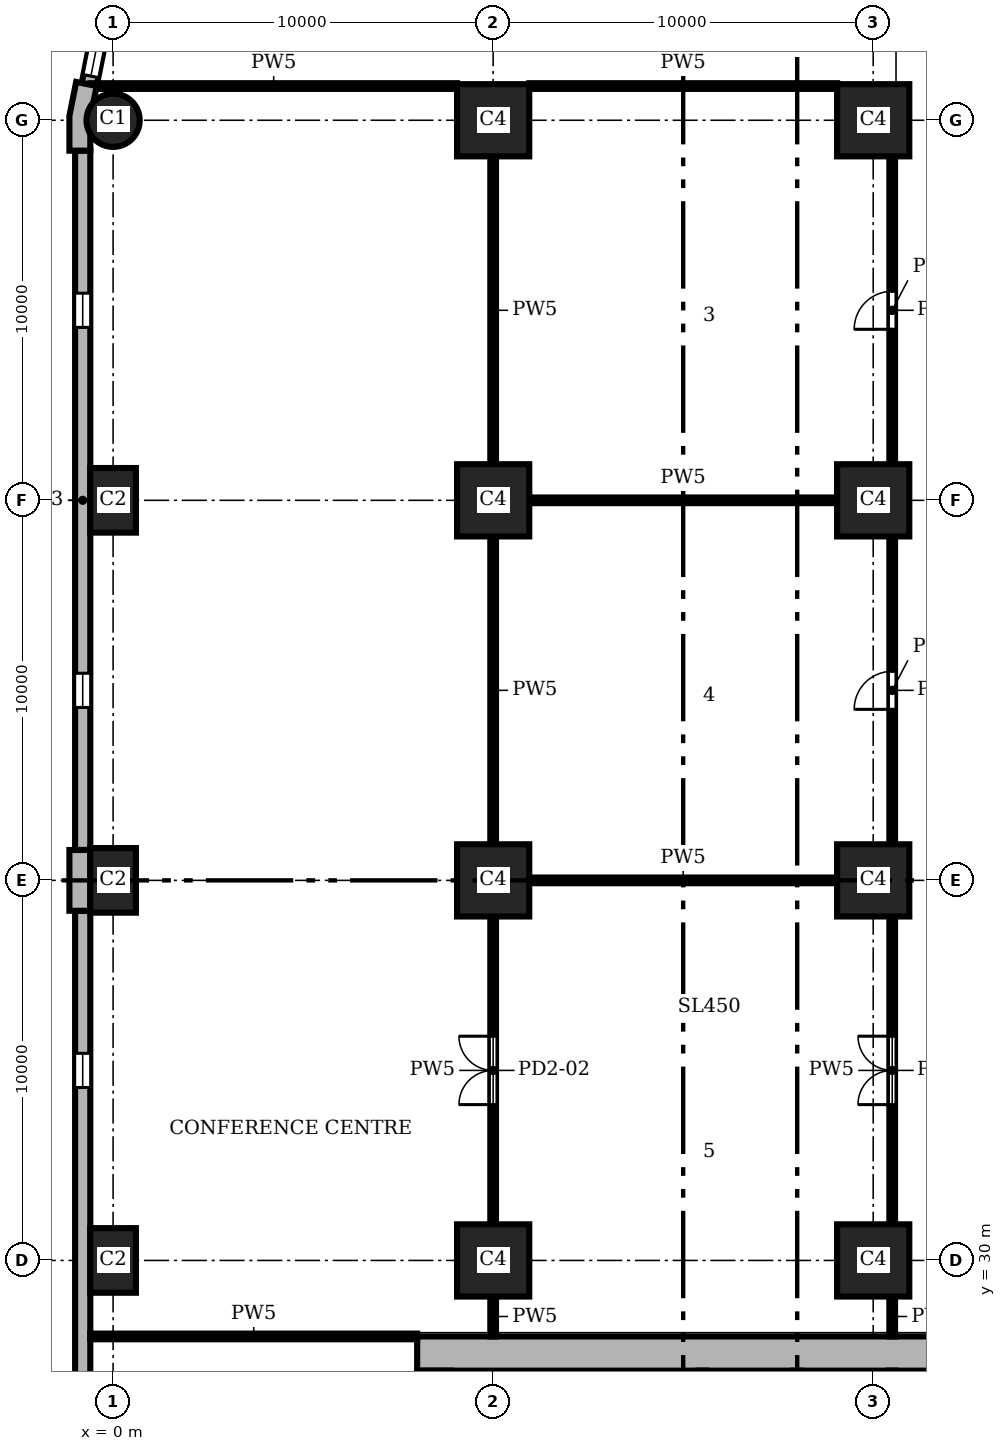
"""IFC4 building model, lengths in metres.
Left out: names, types, materials, properties, quantities, classifications, styles, units other than length and angle.
Written with IfcOpenShell. Run it as: python <this file> out.ifc"""

import sys

from ifc_helpers import new_model, si_unit, direction, frame, frame_2d, origin, origin_2d, place, context, subcontext, project, spatial, polyline, rectangle, circle, outline, extrude, element, fill, save


model = new_model("IFC4")
c1 = context("Model", 3, precision=1e-05, world=origin(), true_north=direction((0.0, 1.0)))
c2 = subcontext(c1, "Body", "Model", "MODEL_VIEW")
j1 = project(units=[si_unit("LENGTHUNIT", "METRE"), si_unit("PLANEANGLEUNIT", "RADIAN")], contexts=[c1])
p1 = place(None, origin())
s1 = spatial("IfcSite", under=j1, at=p1, CompositionType="ELEMENT")
p2 = place(p1, origin())
s2 = spatial("IfcBuilding", under=s1, at=p2, CompositionType="ELEMENT")
p3 = place(p2, frame((0.0, 0.0, 6.0)))
s3 = spatial("IfcBuildingStorey", under=s2, at=p3, CompositionType="ELEMENT", Elevation=6.0)
p4 = place(p3, frame((0.0, 60.0, 0.0), z_axis=(0.0, 0.0, 1.0), x_axis=(1.0, 0.0, 0.0)))
e1 = element("IfcColumn", 1, at=p4, inside=s3, PredefinedType="COLUMN", context=c2, shape_type="SweptSolid", body=[
    extrude(circle(Radius=0.7, at=origin_2d()), origin(), (0.0, 0.0, 1.0), 6.0),
])
for number, where, z_axis, x_axis in (
    (2, (0.0, 50.0, 0.0), (0.0, 0.0, 1.0), (0.0, 1.0, 0.0)),
    (3, (0.0, 40.0, 0.0), (0.0, 0.0, 1.0), (0.0, 1.0, 0.0)),
    (4, (0.0, 30.0, 0.0), (0.0, 0.0, 1.0), (0.0, 1.0, 0.0)),
):
    element("IfcColumn", number, at=place(p3, frame(where, z_axis=z_axis, x_axis=x_axis)), inside=s3, PredefinedType="COLUMN", context=c2, shape_type="SweptSolid", body=[
        extrude(rectangle(XDim=1.7, YDim=1.2, at=origin_2d()), origin(), (0.0, 0.0, 1.0), 6.0),
    ])
for number, where, z_axis, x_axis in (
    (5, (10.0, 30.0, 0.0), (0.0, 0.0, 1.0), (1.0, 0.0, 0.0)),
    (6, (10.0, 40.0, 0.0), (0.0, 0.0, 1.0), (1.0, 0.0, 0.0)),
    (7, (10.0, 50.0, 0.0), (0.0, 0.0, 1.0), (1.0, 0.0, 0.0)),
    (8, (10.0, 60.0, 0.0), (0.0, 0.0, 1.0), (1.0, 0.0, 0.0)),
    (9, (20.0, 30.0, 0.0), (0.0, 0.0, 1.0), (1.0, 0.0, 0.0)),
    (10, (20.0, 40.0, 0.0), (0.0, 0.0, 1.0), (1.0, 0.0, 0.0)),
    (11, (20.0, 50.0, 0.0), (0.0, 0.0, 1.0), (1.0, 0.0, 0.0)),
    (12, (20.0, 60.0, 0.0), (0.0, 0.0, 1.0), (1.0, 0.0, 0.0)),
):
    element("IfcColumn", number, at=place(p3, frame(where, z_axis=z_axis, x_axis=x_axis)), inside=s3, PredefinedType="COLUMN", context=c2, shape_type="SweptSolid", body=[
        extrude(rectangle(XDim=1.9, YDim=1.9, at=origin_2d()), origin(), (0.0, 0.0, 1.0), 6.0),
    ])
p5 = place(p3, frame((28.0, 27.55, 0.0), z_axis=(0.0, 0.0, 1.0), x_axis=(-1.0, 0.0, 0.0)))
e13 = element("IfcWall", 13, at=p5, inside=s3, PredefinedType="SHEAR", context=c2, shape_type="SweptSolid", body=[
    extrude(rectangle(XDim=20.0, YDim=0.9, at=frame_2d((10.0, 0.0))), origin(), (0.0, 0.0, 1.0), 6.0),
])
p6 = place(p3, origin())
e14 = element("IfcWall", 14, at=p6, inside=s3, PredefinedType="SOLIDWALL", context=c2, shape_type="SweptSolid", body=[
    extrude(outline(polyline([(-0.825, 60.98), (-0.972, 61.009), (-1.15, 60.113), (-1.15, 59.2), (-1.0, 59.2), (-0.6, 59.2), (-0.6, 60.059), (-0.432, 60.902), (-0.825, 60.98)])), origin(), (0.0, 0.0, 1.0), 6.0),
])
e15 = element("IfcWall", 15, at=p6, inside=s3, PredefinedType="SOLIDWALL", context=c2, shape_type="SweptSolid", body=[
    extrude(outline(polyline([(-1.0, 40.8), (-1.15, 40.8), (-1.15, 40.0), (-1.15, 39.2), (-1.0, 39.2), (-0.6, 39.2), (-0.6, 40.0), (-0.6, 40.8), (-1.0, 40.8)])), origin(), (0.0, 0.0, 1.0), 6.0),
])
p7 = place(p3, frame((0.299, 65.602, 0.0), z_axis=(0.0, 0.0, 1.0), x_axis=(-0.195098533057, -0.98078364709, 0.0)))
e16 = element("IfcWall", 16, at=p7, inside=s3, PredefinedType="SOLIDWALL", context=c2, shape_type="SweptSolid", body=[
    extrude(rectangle(XDim=4.753, YDim=0.4, at=frame_2d((2.376, 0.0))), origin(), (0.0, 0.0, 1.0), 6.0),
])
p8 = place(p7, frame((0.226, 0.0, 0.9)))
e17 = element("IfcOpeningElement", 17, at=p8, cuts=e16, PredefinedType="OPENING", context=c2, shape_type="SweptSolid", body=[
    extrude(rectangle(XDim=4.3, YDim=4.4, at=frame_2d((2.15, 2.2))), frame((0.0, 0.21, 0.0), z_axis=(0.0, -1.0, 0.0), x_axis=(1.0, 0.0, 0.0)), (0.0, 0.0, 1.0), 0.42),
])
p9 = place(p3, frame((-0.8, 59.2, 0.0), z_axis=(0.0, 0.0, 1.0), x_axis=(0.0, -1.0, 0.0)))
e18 = element("IfcWall", 18, at=p9, inside=s3, PredefinedType="SOLIDWALL", context=c2, shape_type="SweptSolid", body=[
    extrude(rectangle(XDim=18.4, YDim=0.4, at=frame_2d((9.2, 0.0))), origin(), (0.0, 0.0, 1.0), 6.0),
])
p10 = place(p9, frame((3.75, 0.0, 1.0)))
e19 = element("IfcOpeningElement", 19, at=p10, cuts=e18, PredefinedType="OPENING", context=c2, shape_type="SweptSolid", body=[
    extrude(rectangle(XDim=0.9, YDim=4.2, at=frame_2d((0.45, 2.1))), frame((0.0, 0.21, 0.0), z_axis=(0.0, -1.0, 0.0), x_axis=(1.0, 0.0, 0.0)), (0.0, 0.0, 1.0), 0.42),
])
p11 = place(p9, frame((13.75, 0.0, 1.0)))
e20 = element("IfcOpeningElement", 20, at=p11, cuts=e18, PredefinedType="OPENING", context=c2, shape_type="SweptSolid", body=[
    extrude(rectangle(XDim=0.9, YDim=4.2, at=frame_2d((0.45, 2.1))), frame((0.0, 0.21, 0.0), z_axis=(0.0, -1.0, 0.0), x_axis=(1.0, 0.0, 0.0)), (0.0, 0.0, 1.0), 0.42),
])
p12 = place(p3, frame((-0.8, 39.2, 0.0), z_axis=(0.0, 0.0, 1.0), x_axis=(0.0, -1.0, 0.0)))
e21 = element("IfcWall", 21, at=p12, inside=s3, PredefinedType="SOLIDWALL", context=c2, shape_type="SweptSolid", body=[
    extrude(rectangle(XDim=18.4, YDim=0.4, at=frame_2d((9.2, 0.0))), origin(), (0.0, 0.0, 1.0), 6.0),
])
p13 = place(p12, frame((3.75, 0.0, 1.0)))
e22 = element("IfcOpeningElement", 22, at=p13, cuts=e21, PredefinedType="OPENING", context=c2, shape_type="SweptSolid", body=[
    extrude(rectangle(XDim=0.9, YDim=4.2, at=frame_2d((0.45, 2.1))), frame((0.0, 0.21, 0.0), z_axis=(0.0, -1.0, 0.0), x_axis=(1.0, 0.0, 0.0)), (0.0, 0.0, 1.0), 0.42),
])
p14 = place(p12, frame((13.75, 0.0, 1.0)))
e23 = element("IfcOpeningElement", 23, at=p14, cuts=e21, PredefinedType="OPENING", context=c2, shape_type="SweptSolid", body=[
    extrude(rectangle(XDim=0.9, YDim=4.2, at=frame_2d((0.45, 2.1))), frame((0.0, 0.21, 0.0), z_axis=(0.0, -1.0, 0.0), x_axis=(1.0, 0.0, 0.0)), (0.0, 0.0, 1.0), 0.42),
])
p15 = place(p3, frame((10.0, 28.0, 0.0), z_axis=(0.0, 0.0, 1.0), x_axis=(0.0, 1.0, 0.0)))
e24 = element("IfcWall", 24, at=p15, inside=s3, PredefinedType="PARTITIONING", context=c2, shape_type="SweptSolid", body=[
    extrude(rectangle(XDim=1.05, YDim=0.15, at=frame_2d((0.525, 0.0))), origin(), (0.0, 0.0, 1.0), 5.68),
])
p16 = place(p3, frame((10.0, 30.95, 0.0), z_axis=(0.0, 0.0, 1.0), x_axis=(0.0, 1.0, 0.0)))
e25 = element("IfcWall", 25, at=p16, inside=s3, PredefinedType="PARTITIONING", context=c2, shape_type="SweptSolid", body=[
    extrude(rectangle(XDim=8.1, YDim=0.15, at=frame_2d((4.05, 0.0))), origin(), (0.0, 0.0, 1.0), 5.68),
])
p17 = place(p16, frame((3.15, 0.0, 0.0)))
e26 = element("IfcOpeningElement", 26, at=p17, cuts=e25, PredefinedType="OPENING", context=c2, shape_type="SweptSolid", body=[
    extrude(rectangle(XDim=1.8, YDim=2.1, at=frame_2d((0.9, 1.05))), frame((0.0, 0.085, 0.0), z_axis=(0.0, -1.0, 0.0), x_axis=(1.0, 0.0, 0.0)), (0.0, 0.0, 1.0), 0.17),
])
for number, where, z_axis, x_axis in (
    (27, (10.0, 40.95, 0.0), (0.0, 0.0, 1.0), (0.0, 1.0, 0.0)),
    (28, (10.0, 50.95, 0.0), (0.0, 0.0, 1.0), (0.0, 1.0, 0.0)),
):
    element("IfcWall", number, at=place(p3, frame(where, z_axis=z_axis, x_axis=x_axis)), inside=s3, PredefinedType="PARTITIONING", context=c2, shape_type="SweptSolid", body=[
        extrude(rectangle(XDim=8.1, YDim=0.15, at=frame_2d((4.05, 0.0))), origin(), (0.0, 0.0, 1.0), 5.68),
    ])
p18 = place(p3, frame((20.5, 28.0, 0.0), z_axis=(0.0, 0.0, 1.0), x_axis=(0.0, 1.0, 0.0)))
e29 = element("IfcWall", 29, at=p18, inside=s3, PredefinedType="PARTITIONING", context=c2, shape_type="SweptSolid", body=[
    extrude(rectangle(XDim=1.05, YDim=0.15, at=frame_2d((0.525, 0.0))), origin(), (0.0, 0.0, 1.0), 5.68),
])
p19 = place(p3, frame((20.5, 30.95, 0.0), z_axis=(0.0, 0.0, 1.0), x_axis=(0.0, 1.0, 0.0)))
e30 = element("IfcWall", 30, at=p19, inside=s3, PredefinedType="PARTITIONING", context=c2, shape_type="SweptSolid", body=[
    extrude(rectangle(XDim=8.1, YDim=0.15, at=frame_2d((4.05, 0.0))), origin(), (0.0, 0.0, 1.0), 5.68),
])
p20 = place(p19, frame((3.15, 0.0, 0.0)))
e31 = element("IfcOpeningElement", 31, at=p20, cuts=e30, PredefinedType="OPENING", context=c2, shape_type="SweptSolid", body=[
    extrude(rectangle(XDim=1.8, YDim=2.1, at=frame_2d((0.9, 1.05))), frame((0.0, 0.085, 0.0), z_axis=(0.0, -1.0, 0.0), x_axis=(1.0, 0.0, 0.0)), (0.0, 0.0, 1.0), 0.17),
])
p21 = place(p3, frame((20.5, 40.95, 0.0), z_axis=(0.0, 0.0, 1.0), x_axis=(0.0, 1.0, 0.0)))
e32 = element("IfcWall", 32, at=p21, inside=s3, PredefinedType="PARTITIONING", context=c2, shape_type="SweptSolid", body=[
    extrude(rectangle(XDim=8.1, YDim=0.15, at=frame_2d((4.05, 0.0))), origin(), (0.0, 0.0, 1.0), 5.68),
])
p22 = place(p21, frame((3.55, 0.0, 0.0)))
e33 = element("IfcOpeningElement", 33, at=p22, cuts=e32, PredefinedType="OPENING", context=c2, shape_type="SweptSolid", body=[
    extrude(rectangle(XDim=1.0, YDim=2.1, at=frame_2d((0.5, 1.05))), frame((0.0, 0.085, 0.0), z_axis=(0.0, -1.0, 0.0), x_axis=(1.0, 0.0, 0.0)), (0.0, 0.0, 1.0), 0.17),
])
p23 = place(p3, frame((20.5, 50.95, 0.0), z_axis=(0.0, 0.0, 1.0), x_axis=(0.0, 1.0, 0.0)))
e34 = element("IfcWall", 34, at=p23, inside=s3, PredefinedType="PARTITIONING", context=c2, shape_type="SweptSolid", body=[
    extrude(rectangle(XDim=8.1, YDim=0.15, at=frame_2d((4.05, 0.0))), origin(), (0.0, 0.0, 1.0), 5.68),
])
p24 = place(p23, frame((3.55, 0.0, 0.0)))
e35 = element("IfcOpeningElement", 35, at=p24, cuts=e34, PredefinedType="OPENING", context=c2, shape_type="SweptSolid", body=[
    extrude(rectangle(XDim=1.0, YDim=2.1, at=frame_2d((0.5, 1.05))), frame((0.0, 0.085, 0.0), z_axis=(0.0, -1.0, 0.0), x_axis=(1.0, 0.0, 0.0)), (0.0, 0.0, 1.0), 0.17),
])
for number, where, z_axis, x_axis in (
    (36, (10.95, 40.0, 0.0), (0.0, 0.0, 1.0), (1.0, 0.0, 0.0)),
    (37, (10.95, 50.0, 0.0), (0.0, 0.0, 1.0), (1.0, 0.0, 0.0)),
):
    element("IfcWall", number, at=place(p3, frame(where, z_axis=z_axis, x_axis=x_axis)), inside=s3, PredefinedType="PARTITIONING", context=c2, shape_type="SweptSolid", body=[
        extrude(rectangle(XDim=8.1, YDim=0.15, at=frame_2d((4.05, 0.0))), origin(), (0.0, 0.0, 1.0), 5.68),
    ])
p25 = place(p3, frame((-0.6, 60.9, 0.0), z_axis=(0.0, 0.0, 1.0), x_axis=(1.0, 0.0, 0.0)))
e38 = element("IfcWall", 38, at=p25, inside=s3, PredefinedType="PARTITIONING", context=c2, shape_type="SweptSolid", body=[
    extrude(rectangle(XDim=9.65, YDim=0.15, at=frame_2d((4.825, 0.0))), origin(), (0.0, 0.0, 1.0), 5.68),
])
p26 = place(p3, frame((10.95, 60.9, 0.0), z_axis=(0.0, 0.0, 1.0), x_axis=(1.0, 0.0, 0.0)))
e39 = element("IfcWall", 39, at=p26, inside=s3, PredefinedType="PARTITIONING", context=c2, shape_type="SweptSolid", body=[
    extrude(rectangle(XDim=8.1, YDim=0.15, at=frame_2d((4.05, 0.0))), origin(), (0.0, 0.0, 1.0), 5.68),
])
p27 = place(p3, frame((-0.6, 28.0, 0.0), z_axis=(0.0, 0.0, 1.0), x_axis=(1.0, 0.0, 0.0)))
e40 = element("IfcWall", 40, at=p27, inside=s3, PredefinedType="PARTITIONING", context=c2, shape_type="SweptSolid", body=[
    extrude(rectangle(XDim=8.6, YDim=0.15, at=frame_2d((4.3, 0.0))), origin(), (0.0, 0.0, 1.0), 5.68),
])
p28 = place(p8, origin())
e41 = element("IfcWindow", 41, at=p28, inside=s3, PartitioningType="SINGLE_PANEL", PredefinedType="WINDOW", context=c2, shape_type="SweptSolid", body=[
    extrude(rectangle(XDim=4.3, YDim=4.4, at=frame_2d((2.15, 2.2))), frame((0.0, 0.16, 0.0), z_axis=(0.0, -1.0, 0.0), x_axis=(1.0, 0.0, 0.0)), (0.0, 0.0, 1.0), 0.06),
])
fill(e17, e41)
p29 = place(p10, origin())
e42 = element("IfcWindow", 42, at=p29, inside=s3, PartitioningType="SINGLE_PANEL", PredefinedType="WINDOW", context=c2, shape_type="SweptSolid", body=[
    extrude(rectangle(XDim=0.9, YDim=4.2, at=frame_2d((0.45, 2.1))), frame((0.0, 0.16, 0.0), z_axis=(0.0, -1.0, 0.0), x_axis=(1.0, 0.0, 0.0)), (0.0, 0.0, 1.0), 0.06),
])
fill(e19, e42)
p30 = place(p11, origin())
e43 = element("IfcWindow", 43, at=p30, inside=s3, PartitioningType="SINGLE_PANEL", PredefinedType="WINDOW", context=c2, shape_type="SweptSolid", body=[
    extrude(rectangle(XDim=0.9, YDim=4.2, at=frame_2d((0.45, 2.1))), frame((0.0, 0.16, 0.0), z_axis=(0.0, -1.0, 0.0), x_axis=(1.0, 0.0, 0.0)), (0.0, 0.0, 1.0), 0.06),
])
fill(e20, e43)
p31 = place(p13, origin())
e44 = element("IfcWindow", 44, at=p31, inside=s3, PartitioningType="SINGLE_PANEL", PredefinedType="WINDOW", context=c2, shape_type="SweptSolid", body=[
    extrude(rectangle(XDim=0.9, YDim=4.2, at=frame_2d((0.45, 2.1))), frame((0.0, 0.16, 0.0), z_axis=(0.0, -1.0, 0.0), x_axis=(1.0, 0.0, 0.0)), (0.0, 0.0, 1.0), 0.06),
])
fill(e22, e44)
p32 = place(p17, origin())
e45 = element("IfcDoor", 45, at=p32, inside=s3, OperationType="DOUBLE_DOOR_SINGLE_SWING", PredefinedType="DOOR", context=c2, shape_type="SweptSolid", body=[
    extrude(rectangle(XDim=1.8, YDim=2.1, at=frame_2d((0.9, 1.05))), frame((0.0, 0.025, 0.0), z_axis=(0.0, -1.0, 0.0), x_axis=(1.0, 0.0, 0.0)), (0.0, 0.0, 1.0), 0.05),
])
fill(e26, e45)
p33 = place(p20, origin())
e46 = element("IfcDoor", 46, at=p33, inside=s3, OperationType="DOUBLE_DOOR_SINGLE_SWING", PredefinedType="DOOR", context=c2, shape_type="SweptSolid", body=[
    extrude(rectangle(XDim=1.8, YDim=2.1, at=frame_2d((0.9, 1.05))), frame((0.0, 0.025, 0.0), z_axis=(0.0, -1.0, 0.0), x_axis=(1.0, 0.0, 0.0)), (0.0, 0.0, 1.0), 0.05),
])
fill(e31, e46)
p34 = place(p22, origin())
e47 = element("IfcDoor", 47, at=p34, inside=s3, OperationType="SINGLE_SWING_LEFT", PredefinedType="DOOR", context=c2, shape_type="SweptSolid", body=[
    extrude(rectangle(XDim=1.0, YDim=2.1, at=frame_2d((0.5, 1.05))), frame((0.0, 0.025, 0.0), z_axis=(0.0, -1.0, 0.0), x_axis=(1.0, 0.0, 0.0)), (0.0, 0.0, 1.0), 0.05),
])
fill(e33, e47)
p35 = place(p24, origin())
e48 = element("IfcDoor", 48, at=p35, inside=s3, OperationType="SINGLE_SWING_LEFT", PredefinedType="DOOR", context=c2, shape_type="SweptSolid", body=[
    extrude(rectangle(XDim=1.0, YDim=2.1, at=frame_2d((0.5, 1.05))), frame((0.0, 0.025, 0.0), z_axis=(0.0, -1.0, 0.0), x_axis=(1.0, 0.0, 0.0)), (0.0, 0.0, 1.0), 0.05),
])
fill(e35, e48)
save(model, sys.argv[1])
